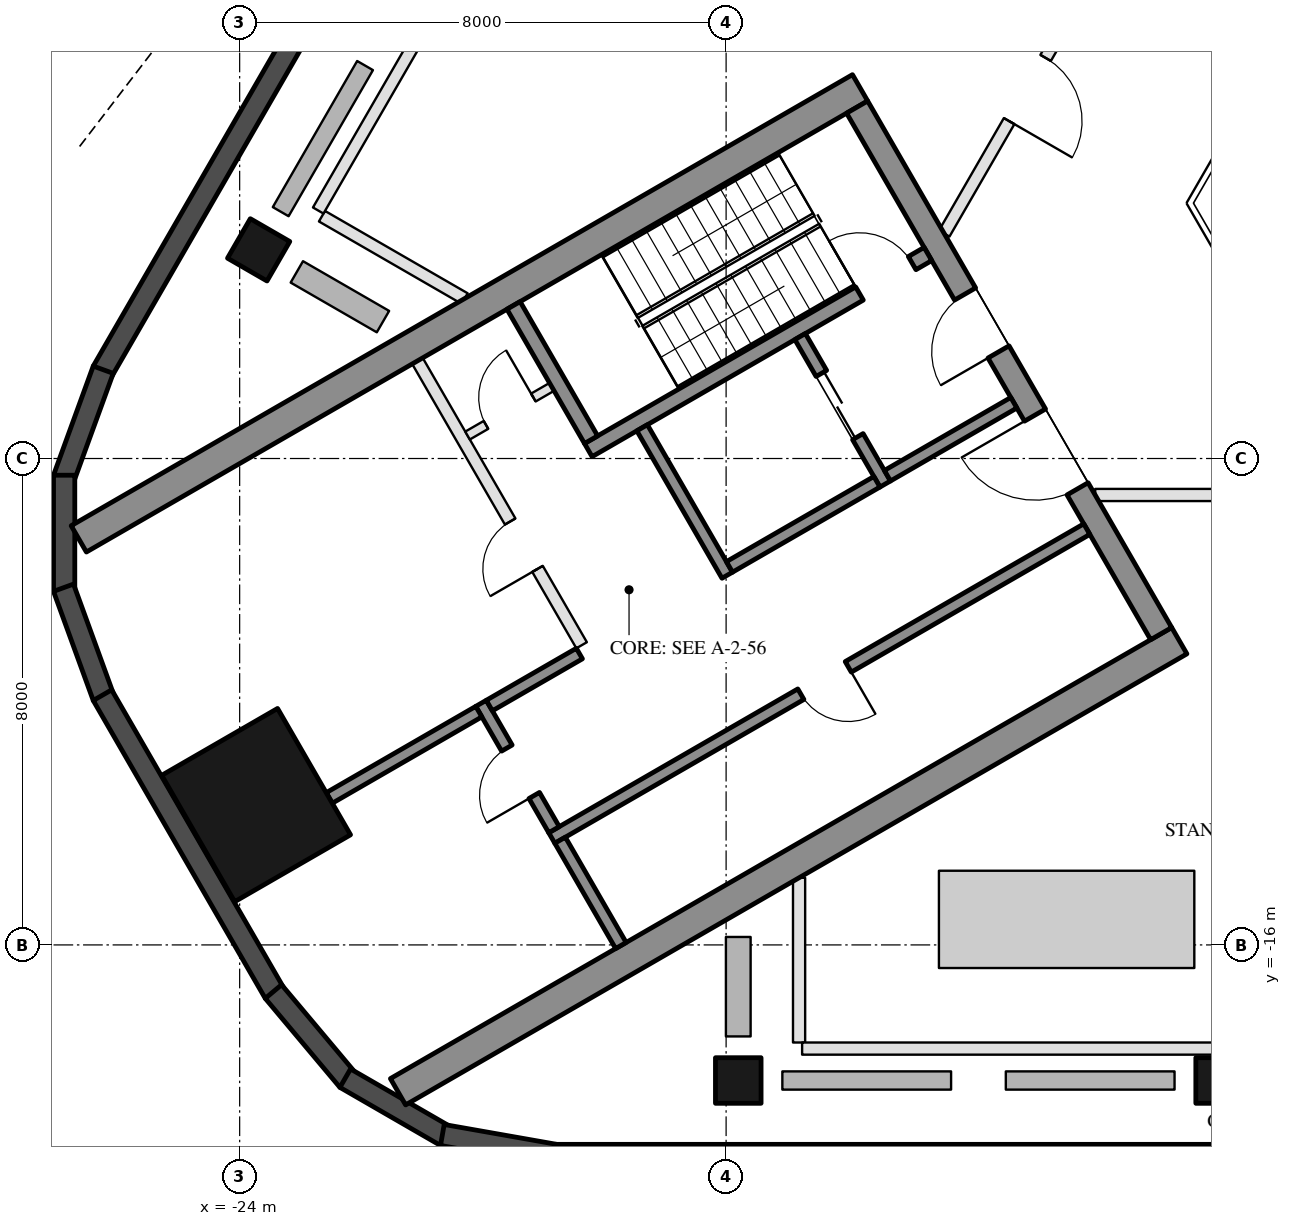
"""IFC4 building model, lengths in metres.
Left out: names, types, materials, properties, quantities, classifications, styles, units other than length and angle.
Written with IfcOpenShell. Run it as: python <this file> out.ifc"""

import sys

from ifc_helpers import new_model, si_unit, direction, frame, frame_2d, origin, origin_2d, place, context, subcontext, project, spatial, rectangle, hollow_rectangle, extrude, element, fill, save


model = new_model("IFC4")
c1 = context("Model", 3, precision=1e-05, world=origin(), true_north=direction((0.0, 1.0)))
c2 = subcontext(c1, "Body", "Model", "MODEL_VIEW")
j1 = project(units=[si_unit("LENGTHUNIT", "METRE"), si_unit("PLANEANGLEUNIT", "RADIAN")], contexts=[c1])
p1 = place(None, origin())
s1 = spatial("IfcSite", under=j1, at=p1, CompositionType="ELEMENT")
p2 = place(p1, origin())
s2 = spatial("IfcBuilding", under=s1, at=p2, CompositionType="ELEMENT")
p3 = place(p2, frame((0.0, 0.0, 242.2)))
s3 = spatial("IfcBuildingStorey", under=s2, at=p3, CompositionType="ELEMENT", Elevation=242.2)
for number, where, z_axis, x_axis in (
    (1, (-15.8, -18.23, 0.0), (0.0, 0.0, 1.0), (-1.0, 0.0, 0.0)),
    (2, (-7.9, -18.23, 0.0), (0.0, 0.0, 1.0), (-1.0, 0.0, 0.0)),
    (3, (-23.688, -4.568, 0.0), (0.0, 0.0, 1.0), (0.5, 0.866, 0.0)),
):
    element("IfcColumn", number, at=place(p3, frame(where, z_axis=z_axis, x_axis=x_axis)), inside=s3, PredefinedType="COLUMN", context=c2, shape_type="SweptSolid", body=[
        extrude(hollow_rectangle(XDim=0.75, YDim=0.75, WallThickness=0.035, at=origin_2d()), origin(), (0.0, 0.0, 1.0), 4.5),
    ])
p4 = place(p3, frame((-23.729, -13.7, 0.0), z_axis=(0.0, 0.0, 1.0), x_axis=(-0.5, 0.866025403784, 0.0)))
e4 = element("IfcColumn", 4, at=p4, inside=s3, PredefinedType="COLUMN", context=c2, shape_type="SweptSolid", body=[
    extrude(hollow_rectangle(XDim=2.4, YDim=2.2, WallThickness=0.06, at=origin_2d()), origin(), (0.0, 0.0, 1.0), 4.5),
])
p5 = place(p3, frame((-7.441, 26.022, 0.0), z_axis=(0.0, 0.0, 1.0), x_axis=(-0.499998380999, -0.866026338513, 0.0)))
e5 = element("IfcWall", 5, at=p5, inside=s3, PredefinedType="SOLIDWALL", context=c2, shape_type="SweptSolid", body=[
    extrude(rectangle(XDim=37.631, YDim=0.35, at=frame_2d((18.816, 0.0))), origin(), (0.0, 0.0, 1.0), 4.35),
])
for number, where, z_axis, x_axis in (
    (6, (-26.244, -6.54, 0.0), (0.0, 0.0, 1.0), (-0.342, -0.94, 0.0)),
    (7, (-26.886, -8.275, 0.0), (0.0, 0.0, 1.0), (0.0, -1.0, 0.0)),
    (8, (-26.897, -10.125, 0.0), (0.0, 0.0, 1.0), (0.342, -0.94, 0.0)),
):
    element("IfcWall", number, at=place(p3, frame(where, z_axis=z_axis, x_axis=x_axis)), inside=s3, PredefinedType="SOLIDWALL", context=c2, shape_type="SweptSolid", body=[
        extrude(rectangle(XDim=1.91, YDim=0.35, at=frame_2d((0.955, 0.0))), origin(), (0.0, 0.0, 1.0), 4.35),
    ])
p6 = place(p3, frame((-26.256, -11.893, 0.0), z_axis=(0.0, 0.0, 1.0), x_axis=(0.499986410639, -0.866033249463, 0.0)))
e9 = element("IfcWall", 9, at=p6, inside=s3, PredefinedType="SOLIDWALL", context=c2, shape_type="SweptSolid", body=[
    extrude(rectangle(XDim=5.658, YDim=0.35, at=frame_2d((2.829, 0.0))), origin(), (0.0, 0.0, 1.0), 4.35),
])
for number, where, z_axis, x_axis in (
    (10, (-23.445, -16.768, 0.0), (0.0, 0.0, 1.0), (0.643, -0.766, 0.0)),
    (11, (-22.264, -18.192, 0.0), (0.0, 0.0, 1.0), (0.866, -0.5, 0.0)),
):
    element("IfcWall", number, at=place(p3, frame(where, z_axis=z_axis, x_axis=x_axis)), inside=s3, PredefinedType="SOLIDWALL", context=c2, shape_type="SweptSolid", body=[
        extrude(rectangle(XDim=1.91, YDim=0.35, at=frame_2d((0.955, 0.0))), origin(), (0.0, 0.0, 1.0), 4.35),
    ])
p7 = place(p3, frame((-20.667, -19.126, 0.0), z_axis=(0.0, 0.0, 1.0), x_axis=(0.984798995425, -0.173697837091, 0.0)))
e12 = element("IfcWall", 12, at=p7, inside=s3, PredefinedType="SOLIDWALL", context=c2, shape_type="SweptSolid", body=[
    extrude(rectangle(XDim=1.91, YDim=0.35, at=frame_2d((0.955, 0.0))), origin(), (0.0, 0.0, 1.0), 4.35),
])
p8 = place(p3, frame((-18.816, -19.455, 0.0), z_axis=(0.0, 0.0, 1.0), x_axis=(1.0, 0.0, 0.0)))
e13 = element("IfcWall", 13, at=p8, inside=s3, PredefinedType="SOLIDWALL", context=c2, shape_type="SweptSolid", body=[
    extrude(rectangle(XDim=37.632, YDim=0.35, at=frame_2d((18.816, 0.0))), origin(), (0.0, 0.0, 1.0), 4.35),
])
for number, where, z_axis, x_axis in (
    (14, (-13.797, -1.903, 0.0), (0.0, 0.0, 1.0), (-0.866, -0.5, 0.0)),
    (15, (-8.547, -10.997, 0.0), (0.0, 0.0, 1.0), (-0.866, -0.5, 0.0)),
):
    element("IfcWall", number, at=place(p3, frame(where, z_axis=z_axis, x_axis=x_axis)), inside=s3, PredefinedType="SHEAR", context=c2, shape_type="SweptSolid", body=[
        extrude(rectangle(XDim=14.837, YDim=0.5, at=frame_2d((7.418, 0.0))), origin(), (0.0, 0.0, 1.0), 4.3),
    ])
p9 = place(p3, frame((-13.845, -2.22, 0.0), z_axis=(0.0, 0.0, 1.0), x_axis=(0.500004234368, -0.866022959057, 0.0)))
e16 = element("IfcWall", 16, at=p9, inside=s3, PredefinedType="SHEAR", context=c2, shape_type="SweptSolid", body=[
    extrude(rectangle(XDim=10.0, YDim=0.4, at=frame_2d((5.0, 0.0))), origin(), (0.0, 0.0, 1.0), 4.3),
])
p10 = place(p9, frame((3.55, 0.0, 0.0)))
e17 = element("IfcOpeningElement", 17, at=p10, cuts=e16, PredefinedType="OPENING", context=c2, shape_type="SweptSolid", body=[
    extrude(rectangle(XDim=1.1, YDim=2.1, at=frame_2d((0.55, 1.05))), frame((0.0, 0.21, 0.0), z_axis=(0.0, -1.0, 0.0), x_axis=(1.0, 0.0, 0.0)), (0.0, 0.0, 1.0), 0.42),
])
p11 = place(p9, frame((5.85, 0.0, 0.0)))
e18 = element("IfcOpeningElement", 18, at=p11, cuts=e16, PredefinedType="OPENING", context=c2, shape_type="SweptSolid", body=[
    extrude(rectangle(XDim=1.4, YDim=2.1, at=frame_2d((0.7, 1.05))), frame((0.0, 0.21, 0.0), z_axis=(0.0, -1.0, 0.0), x_axis=(1.0, 0.0, 0.0)), (0.0, 0.0, 1.0), 0.42),
])
p12 = place(p3, frame((-12.681, -4.636, 0.0), z_axis=(0.0, 0.0, 1.0), x_axis=(-0.866021702275, -0.500006411147, 0.0)))
e19 = element("IfcWall", 19, at=p12, inside=s3, PredefinedType="SHEAR", context=c2, shape_type="SweptSolid", body=[
    extrude(rectangle(XDim=6.45, YDim=0.25, at=frame_2d((3.225, 0.0))), origin(), (0.0, 0.0, 1.0), 4.3),
])
p13 = place(p12, frame((0.3, 0.0, 0.0)))
e20 = element("IfcOpeningElement", 20, at=p13, cuts=e19, PredefinedType="OPENING", context=c2, shape_type="SweptSolid", body=[
    extrude(rectangle(XDim=1.0, YDim=2.1, at=frame_2d((0.5, 1.05))), frame((0.0, 0.135, 0.0), z_axis=(0.0, -1.0, 0.0), x_axis=(1.0, 0.0, 0.0)), (0.0, 0.0, 1.0), 0.27),
])
p14 = place(p3, frame((-19.496, -5.482, 0.0), z_axis=(0.0, 0.0, 1.0), x_axis=(0.499990435942, -0.866030925526, 0.0)))
e21 = element("IfcWall", 21, at=p14, inside=s3, PredefinedType="SHEAR", context=c2, shape_type="SweptSolid", body=[
    extrude(rectangle(XDim=2.55, YDim=0.25, at=frame_2d((1.275, 0.0))), origin(), (0.0, 0.0, 1.0), 4.3),
])
p15 = place(p3, frame((-17.381, -7.495, 0.0), z_axis=(0.0, 0.0, 1.0), x_axis=(0.500011755427, -0.866018616679, 0.0)))
e22 = element("IfcWall", 22, at=p15, inside=s3, PredefinedType="SHEAR", context=c2, shape_type="SweptSolid", body=[
    extrude(rectangle(XDim=2.8, YDim=0.2, at=frame_2d((1.4, 0.0))), origin(), (0.0, 0.0, 1.0), 4.3),
])
p16 = place(p3, frame((-14.783, -5.995, 0.0), z_axis=(0.0, 0.0, 1.0), x_axis=(0.49994636267, -0.866056369097, 0.0)))
e23 = element("IfcWall", 23, at=p16, inside=s3, PredefinedType="SHEAR", context=c2, shape_type="SweptSolid", body=[
    extrude(rectangle(XDim=2.8, YDim=0.2, at=frame_2d((1.4, 0.0))), origin(), (0.0, 0.0, 1.0), 4.3),
])
p17 = place(p16, frame((0.7, 0.0, 0.0)))
e24 = element("IfcOpeningElement", 24, at=p17, cuts=e23, PredefinedType="OPENING", context=c2, shape_type="SweptSolid", body=[
    extrude(rectangle(XDim=1.2, YDim=2.1, at=frame_2d((0.6, 1.05))), frame((0.0, 0.11, 0.0), z_axis=(0.0, -1.0, 0.0), x_axis=(1.0, 0.0, 0.0)), (0.0, 0.0, 1.0), 0.22),
])
p18 = place(p3, frame((-13.52, -8.383, 0.0), z_axis=(0.0, 0.0, 1.0), x_axis=(-0.866034573852, -0.49998411664, 0.0)))
e25 = element("IfcWall", 25, at=p18, inside=s3, PredefinedType="SHEAR", context=c2, shape_type="SweptSolid", body=[
    extrude(rectangle(XDim=2.8, YDim=0.2, at=frame_2d((1.4, 0.0))), origin(), (0.0, 0.0, 1.0), 4.3),
])
p19 = place(p3, frame((-11.268, -7.083, 0.0), z_axis=(0.0, 0.0, 1.0), x_axis=(-0.866050077142, -0.499957262057, 0.0)))
e26 = element("IfcWall", 26, at=p19, inside=s3, PredefinedType="SHEAR", context=c2, shape_type="SweptSolid", body=[
    extrude(rectangle(XDim=2.4, YDim=0.2, at=frame_2d((1.2, 0.0))), origin(), (0.0, 0.0, 1.0), 4.3),
])
p20 = place(p3, frame((-10.068, -9.162, 0.0), z_axis=(0.0, 0.0, 1.0), x_axis=(-0.866032725843, -0.499987317609, 0.0)))
e27 = element("IfcWall", 27, at=p20, inside=s3, PredefinedType="SHEAR", context=c2, shape_type="SweptSolid", body=[
    extrude(rectangle(XDim=10.16, YDim=0.2, at=frame_2d((5.08, 0.0))), origin(), (0.0, 0.0, 1.0), 4.3),
])
p21 = place(p20, frame((4.53, 0.0, 0.0)))
e28 = element("IfcOpeningElement", 28, at=p21, cuts=e27, PredefinedType="OPENING", context=c2, shape_type="SweptSolid", body=[
    extrude(rectangle(XDim=0.9, YDim=2.1, at=frame_2d((0.45, 1.05))), frame((0.0, 0.11, 0.0), z_axis=(0.0, -1.0, 0.0), x_axis=(1.0, 0.0, 0.0)), (0.0, 0.0, 1.0), 0.22),
])
p22 = place(p3, frame((-20.031, -12.026, 0.0), z_axis=(0.0, 0.0, 1.0), x_axis=(0.500033551112, -0.866006032174, 0.0)))
e29 = element("IfcWall", 29, at=p22, inside=s3, PredefinedType="SHEAR", context=c2, shape_type="SweptSolid", body=[
    extrude(rectangle(XDim=2.4, YDim=0.2, at=frame_2d((1.2, 0.0))), origin(), (0.0, 0.0, 1.0), 4.3),
])
p23 = place(p22, frame((0.85, 0.0, 0.0)))
e30 = element("IfcOpeningElement", 30, at=p23, cuts=e29, PredefinedType="OPENING", context=c2, shape_type="SweptSolid", body=[
    extrude(rectangle(XDim=0.9, YDim=2.1, at=frame_2d((0.45, 1.05))), frame((0.0, 0.11, 0.0), z_axis=(0.0, -1.0, 0.0), x_axis=(1.0, 0.0, 0.0)), (0.0, 0.0, 1.0), 0.22),
])
p24 = place(p3, frame((-18.413, -11.208, 0.0), z_axis=(0.0, 0.0, 1.0), x_axis=(-0.866038183914, -0.499977863513, 0.0)))
e31 = element("IfcWall", 31, at=p24, inside=s3, PredefinedType="SHEAR", context=c2, shape_type="SweptSolid", body=[
    extrude(rectangle(XDim=1.71, YDim=0.2, at=frame_2d((0.855, 0.0))), origin(), (0.0, 0.0, 1.0), 4.3),
])
p25 = place(p3, frame((-18.73, -14.278, 0.0), z_axis=(0.0, 0.0, 1.0), x_axis=(0.50002537861, -0.866010750942, 0.0)))
e32 = element("IfcWall", 32, at=p25, inside=s3, PredefinedType="SHEAR", context=c2, shape_type="SweptSolid", body=[
    extrude(rectangle(XDim=2.0, YDim=0.2, at=frame_2d((1.0, 0.0))), origin(), (0.0, 0.0, 1.0), 4.3),
])
p26 = place(p3, frame((-20.067, -12.163, 0.0), z_axis=(0.0, 0.0, 1.0), x_axis=(-0.866055327414, -0.49994816717, 0.0)))
e33 = element("IfcWall", 33, at=p26, inside=s3, PredefinedType="SHEAR", context=c2, shape_type="SweptSolid", body=[
    extrude(rectangle(XDim=2.84, YDim=0.2, at=frame_2d((1.42, 0.0))), origin(), (0.0, 0.0, 1.0), 4.3),
])
p27 = place(p3, frame((-21.076, -6.395, 0.0), z_axis=(0.0, 0.0, 1.0), x_axis=(0.50001468107, -0.866016927499, 0.0)))
e34 = element("IfcWall", 34, at=p27, inside=s3, PredefinedType="PARTITIONING", context=c2, shape_type="SweptSolid", body=[
    extrude(rectangle(XDim=5.4, YDim=0.2, at=frame_2d((2.7, 0.0))), origin(), (0.0, 0.0, 1.0), 4.3),
])
p28 = place(p27, frame((3.05, 0.0, 0.0)))
e35 = element("IfcOpeningElement", 35, at=p28, cuts=e34, PredefinedType="OPENING", context=c2, shape_type="SweptSolid", body=[
    extrude(rectangle(XDim=0.9, YDim=2.1, at=frame_2d((0.45, 1.05))), frame((0.0, 0.11, 0.0), z_axis=(0.0, -1.0, 0.0), x_axis=(1.0, 0.0, 0.0)), (0.0, 0.0, 1.0), 0.22),
])
p29 = place(p3, frame((-18.866, -6.822, 0.0), z_axis=(0.0, 0.0, 1.0), x_axis=(-0.866028054938, -0.499995408039, 0.0)))
e36 = element("IfcWall", 36, at=p29, inside=s3, PredefinedType="PARTITIONING", context=c2, shape_type="SweptSolid", body=[
    extrude(rectangle(XDim=1.6, YDim=0.15, at=frame_2d((0.8, 0.0))), origin(), (0.0, 0.0, 1.0), 4.3),
])
p30 = place(p29, frame((0.35, 0.0, 0.0)))
e37 = element("IfcOpeningElement", 37, at=p30, cuts=e36, PredefinedType="OPENING", context=c2, shape_type="SweptSolid", body=[
    extrude(rectangle(XDim=0.9, YDim=2.1, at=frame_2d((0.45, 1.05))), frame((0.0, 0.085, 0.0), z_axis=(0.0, -1.0, 0.0), x_axis=(1.0, 0.0, 0.0)), (0.0, 0.0, 1.0), 0.17),
])
p31 = place(p3, frame((-14.8, -17.605, 0.0), z_axis=(0.0, 0.0, 1.0), x_axis=(0.0, 1.0, 0.0)))
e38 = element("IfcWall", 38, at=p31, inside=s3, PredefinedType="PARTITIONING", context=c2, shape_type="SweptSolid", body=[
    extrude(rectangle(XDim=2.709, YDim=0.2, at=frame_2d((1.355, 0.0))), origin(), (0.0, 0.0, 1.0), 4.35),
])
p32 = place(p3, frame((-14.75, -17.705, 0.0), z_axis=(0.0, 0.0, 1.0), x_axis=(1.0, 0.0, 0.0)))
e39 = element("IfcWall", 39, at=p32, inside=s3, PredefinedType="PARTITIONING", context=c2, shape_type="SweptSolid", body=[
    extrude(rectangle(XDim=29.5, YDim=0.2, at=frame_2d((14.75, 0.0))), origin(), (0.0, 0.0, 1.0), 3.75),
])
p33 = place(p3, frame((-9.93, -8.6, 0.0), z_axis=(0.0, 0.0, 1.0), x_axis=(1.0, 0.0, 0.0)))
e40 = element("IfcWall", 40, at=p33, inside=s3, PredefinedType="PARTITIONING", context=c2, shape_type="SweptSolid", body=[
    extrude(rectangle(XDim=19.861, YDim=0.2, at=frame_2d((9.93, 0.0))), origin(), (0.0, 0.0, 1.0), 3.75),
])
p34 = place(p33, frame((2.871, 0.0, 0.0)))
e41 = element("IfcOpeningElement", 41, at=p34, cuts=e40, PredefinedType="OPENING", context=c2, shape_type="SweptSolid", body=[
    extrude(rectangle(XDim=1.2, YDim=2.1, at=frame_2d((0.6, 1.05))), frame((0.0, 0.11, 0.0), z_axis=(0.0, -1.0, 0.0), x_axis=(1.0, 0.0, 0.0)), (0.0, 0.0, 1.0), 0.22),
])
p35 = place(p33, frame((10.081, 0.0, 0.0)))
e42 = element("IfcOpeningElement", 42, at=p35, cuts=e40, PredefinedType="OPENING", context=c2, shape_type="SweptSolid", body=[
    extrude(rectangle(XDim=1.2, YDim=2.1, at=frame_2d((0.6, 1.05))), frame((0.0, 0.11, 0.0), z_axis=(0.0, -1.0, 0.0), x_axis=(1.0, 0.0, 0.0)), (0.0, 0.0, 1.0), 0.22),
])
p36 = place(p33, frame((16.54, 0.0, 0.0)))
e43 = element("IfcOpeningElement", 43, at=p36, cuts=e40, PredefinedType="OPENING", context=c2, shape_type="SweptSolid", body=[
    extrude(rectangle(XDim=1.2, YDim=2.1, at=frame_2d((0.6, 1.05))), frame((0.0, 0.11, 0.0), z_axis=(0.0, -1.0, 0.0), x_axis=(1.0, 0.0, 0.0)), (0.0, 0.0, 1.0), 0.22),
])
p37 = place(p3, frame((-22.646, -4.015, 0.0), z_axis=(0.0, 0.0, 1.0), x_axis=(0.866044551023, -0.499966834543, 0.0)))
e44 = element("IfcWall", 44, at=p37, inside=s3, PredefinedType="PARTITIONING", context=c2, shape_type="SweptSolid", body=[
    extrude(rectangle(XDim=2.71, YDim=0.2, at=frame_2d((1.355, 0.0))), origin(), (0.0, 0.0, 1.0), 4.35),
])
p38 = place(p3, frame((-7.958, 21.626, 0.0), z_axis=(0.0, 0.0, 1.0), x_axis=(-0.499998500593, -0.866026269466, 0.0)))
e45 = element("IfcWall", 45, at=p38, inside=s3, PredefinedType="PARTITIONING", context=c2, shape_type="SweptSolid", body=[
    extrude(rectangle(XDim=29.5, YDim=0.2, at=frame_2d((14.75, 0.0))), origin(), (0.0, 0.0, 1.0), 3.75),
])
p39 = place(p3, frame((-2.482, 12.9, 0.0), z_axis=(0.0, 0.0, 1.0), x_axis=(-0.50000478328, -0.866022642139, 0.0)))
e46 = element("IfcWall", 46, at=p39, inside=s3, PredefinedType="PARTITIONING", context=c2, shape_type="SweptSolid", body=[
    extrude(rectangle(XDim=19.861, YDim=0.2, at=frame_2d((9.931, 0.0))), origin(), (0.0, 0.0, 1.0), 3.75),
])
p40 = place(p39, frame((1.635, 0.0, 0.0)))
e47 = element("IfcOpeningElement", 47, at=p40, cuts=e46, PredefinedType="OPENING", context=c2, shape_type="SweptSolid", body=[
    extrude(rectangle(XDim=1.2, YDim=2.1, at=frame_2d((0.6, 1.05))), frame((0.0, 0.11, 0.0), z_axis=(0.0, -1.0, 0.0), x_axis=(1.0, 0.0, 0.0)), (0.0, 0.0, 1.0), 0.22),
])
p41 = place(p39, frame((6.107, 0.0, 0.0)))
e48 = element("IfcOpeningElement", 48, at=p41, cuts=e46, PredefinedType="OPENING", context=c2, shape_type="SweptSolid", body=[
    extrude(rectangle(XDim=1.2, YDim=2.1, at=frame_2d((0.6, 1.05))), frame((0.0, 0.11, 0.0), z_axis=(0.0, -1.0, 0.0), x_axis=(1.0, 0.0, 0.0)), (0.0, 0.0, 1.0), 0.22),
])
p42 = place(p39, frame((11.054, 0.0, 0.0)))
e49 = element("IfcOpeningElement", 49, at=p42, cuts=e46, PredefinedType="OPENING", context=c2, shape_type="SweptSolid", body=[
    extrude(rectangle(XDim=1.2, YDim=2.1, at=frame_2d((0.6, 1.05))), frame((0.0, 0.11, 0.0), z_axis=(0.0, -1.0, 0.0), x_axis=(1.0, 0.0, 0.0)), (0.0, 0.0, 1.0), 0.22),
])
p43 = place(p39, frame((16.526, 0.0, 0.0)))
e50 = element("IfcOpeningElement", 50, at=p43, cuts=e46, PredefinedType="OPENING", context=c2, shape_type="SweptSolid", body=[
    extrude(rectangle(XDim=1.2, YDim=2.1, at=frame_2d((0.6, 1.05))), frame((0.0, 0.11, 0.0), z_axis=(0.0, -1.0, 0.0), x_axis=(1.0, 0.0, 0.0)), (0.0, 0.0, 1.0), 0.22),
])
p44 = place(p17, origin())
e51 = element("IfcDoor", 51, at=p44, inside=s3, OperationType="DOUBLE_DOOR_SLIDING", PredefinedType="DOOR", context=c2, shape_type="SweptSolid", body=[
    extrude(rectangle(XDim=1.2, YDim=2.1, at=frame_2d((0.6, 1.05))), frame((0.0, 0.025, 0.0), z_axis=(0.0, -1.0, 0.0), x_axis=(1.0, 0.0, 0.0)), (0.0, 0.0, 1.0), 0.05),
])
fill(e24, e51)
p45 = place(p30, frame((0.9, 0.0, 0.0), z_axis=(0.0, 0.0, 1.0), x_axis=(-1.0, 0.0, 0.0)))
e52 = element("IfcDoor", 52, at=p45, inside=s3, OperationType="SINGLE_SWING_RIGHT", PredefinedType="DOOR", context=c2, shape_type="SweptSolid", body=[
    extrude(rectangle(XDim=0.9, YDim=2.1, at=frame_2d((0.45, 1.05))), frame((0.0, 0.025, 0.0), z_axis=(0.0, -1.0, 0.0), x_axis=(1.0, 0.0, 0.0)), (0.0, 0.0, 1.0), 0.05),
])
fill(e37, e52)
p46 = place(p21, origin())
e53 = element("IfcDoor", 53, at=p46, inside=s3, OperationType="SINGLE_SWING_LEFT", PredefinedType="DOOR", context=c2, shape_type="SweptSolid", body=[
    extrude(rectangle(XDim=0.9, YDim=2.1, at=frame_2d((0.45, 1.05))), frame((0.0, 0.025, 0.0), z_axis=(0.0, -1.0, 0.0), x_axis=(1.0, 0.0, 0.0)), (0.0, 0.0, 1.0), 0.05),
])
fill(e28, e53)
p47 = place(p23, frame((0.9, 0.0, 0.0), z_axis=(0.0, 0.0, 1.0), x_axis=(-1.0, 0.0, 0.0)))
e54 = element("IfcDoor", 54, at=p47, inside=s3, OperationType="SINGLE_SWING_LEFT", PredefinedType="DOOR", context=c2, shape_type="SweptSolid", body=[
    extrude(rectangle(XDim=0.9, YDim=2.1, at=frame_2d((0.45, 1.05))), frame((0.0, 0.025, 0.0), z_axis=(0.0, -1.0, 0.0), x_axis=(1.0, 0.0, 0.0)), (0.0, 0.0, 1.0), 0.05),
])
fill(e30, e54)
p48 = place(p28, frame((0.9, 0.0, 0.0), z_axis=(0.0, 0.0, 1.0), x_axis=(-1.0, 0.0, 0.0)))
e55 = element("IfcDoor", 55, at=p48, inside=s3, OperationType="SINGLE_SWING_LEFT", PredefinedType="DOOR", context=c2, shape_type="SweptSolid", body=[
    extrude(rectangle(XDim=0.9, YDim=2.1, at=frame_2d((0.45, 1.05))), frame((0.0, 0.025, 0.0), z_axis=(0.0, -1.0, 0.0), x_axis=(1.0, 0.0, 0.0)), (0.0, 0.0, 1.0), 0.05),
])
fill(e35, e55)
p49 = place(p10, frame((1.1, 0.0, 0.0), z_axis=(0.0, 0.0, 1.0), x_axis=(-1.0, 0.0, 0.0)))
e56 = element("IfcDoor", 56, at=p49, inside=s3, OperationType="SINGLE_SWING_LEFT", PredefinedType="DOOR", context=c2, shape_type="SweptSolid", body=[
    extrude(rectangle(XDim=1.1, YDim=2.1, at=frame_2d((0.55, 1.05))), frame((0.0, 0.025, 0.0), z_axis=(0.0, -1.0, 0.0), x_axis=(1.0, 0.0, 0.0)), (0.0, 0.0, 1.0), 0.05),
])
fill(e17, e56)
p50 = place(p11, frame((1.4, 0.0, 0.0), z_axis=(0.0, 0.0, 1.0), x_axis=(-1.0, 0.0, 0.0)))
e57 = element("IfcDoor", 57, at=p50, inside=s3, OperationType="DOUBLE_DOOR_SINGLE_SWING", PredefinedType="DOOR", context=c2, shape_type="SweptSolid", body=[
    extrude(rectangle(XDim=1.4, YDim=2.1, at=frame_2d((0.7, 1.05))), frame((0.0, 0.025, 0.0), z_axis=(0.0, -1.0, 0.0), x_axis=(1.0, 0.0, 0.0)), (0.0, 0.0, 1.0), 0.05),
])
fill(e18, e57)
p51 = place(p13, frame((1.0, 0.0, 0.0), z_axis=(0.0, 0.0, 1.0), x_axis=(-1.0, 0.0, 0.0)))
e58 = element("IfcDoor", 58, at=p51, inside=s3, OperationType="SINGLE_SWING_LEFT", PredefinedType="DOOR", context=c2, shape_type="SweptSolid", body=[
    extrude(rectangle(XDim=1.0, YDim=2.1, at=frame_2d((0.5, 1.05))), frame((0.0, 0.025, 0.0), z_axis=(0.0, -1.0, 0.0), x_axis=(1.0, 0.0, 0.0)), (0.0, 0.0, 1.0), 0.05),
])
fill(e20, e58)
p52 = place(p43, origin())
e59 = element("IfcDoor", 59, at=p52, inside=s3, OperationType="SINGLE_SWING_RIGHT", PredefinedType="DOOR", context=c2, shape_type="SweptSolid", body=[
    extrude(rectangle(XDim=1.2, YDim=2.1, at=frame_2d((0.6, 1.05))), frame((0.0, 0.025, 0.0), z_axis=(0.0, -1.0, 0.0), x_axis=(1.0, 0.0, 0.0)), (0.0, 0.0, 1.0), 0.05),
])
fill(e50, e59)
save(model, sys.argv[1])
